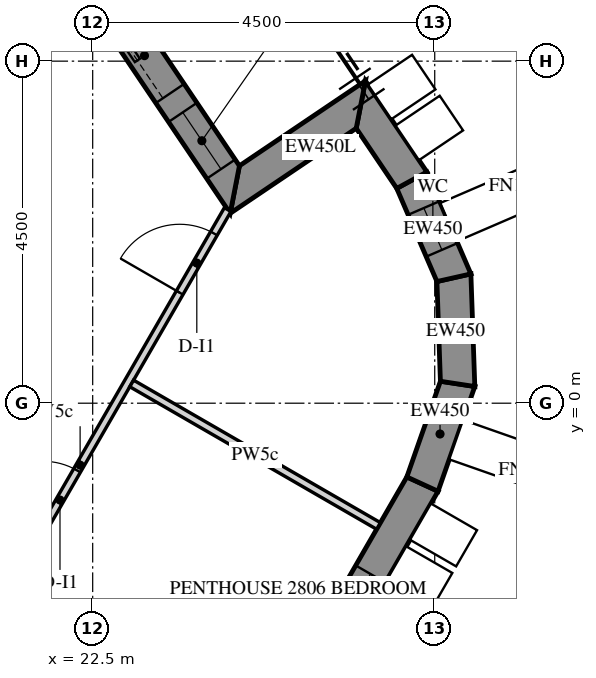
"""IFC4 building model, lengths in metres.
Left out: names, types, materials, properties, quantities, classifications, styles, units other than length and angle.
Written with IfcOpenShell. Run it as: python <this file> out.ifc"""

import sys

from ifc_helpers import new_model, si_unit, direction, frame, frame_2d, origin, place, context, subcontext, project, spatial, polyline, rectangle, outline, extrude, element, fill, save


model = new_model("IFC4")
c1 = context("Model", 3, precision=1e-05, world=origin(), true_north=direction((0.0, 1.0)))
c2 = subcontext(c1, "Body", "Model", "MODEL_VIEW")
j1 = project(units=[si_unit("LENGTHUNIT", "METRE"), si_unit("PLANEANGLEUNIT", "RADIAN")], contexts=[c1])
p1 = place(None, origin())
s1 = spatial("IfcSite", under=j1, at=p1, CompositionType="ELEMENT")
p2 = place(p1, origin())
s2 = spatial("IfcBuilding", under=s1, at=p2, CompositionType="ELEMENT")
p3 = place(p2, frame((0.0, 0.0, 361.2)))
s3 = spatial("IfcBuildingStorey", under=s2, at=p3, CompositionType="ELEMENT", Elevation=361.2)
p4 = place(p3, frame((15.273, -21.097, -0.15), z_axis=(0.0, 0.0, 1.0), x_axis=(0.499997453958, 0.866026873738, 0.0)))
e1 = element("IfcWall", 1, at=p4, inside=s3, PredefinedType="SOLIDWALL", context=c2, shape_type="SweptSolid", body=[
    extrude(outline(polyline([(-0.018, -0.225), (23.152, -0.225), (23.11, 0.225), (0.018, 0.225), (-0.018, -0.225)])), origin(), (0.0, 0.0, 1.0), 3.9),
])
p5 = place(p4, frame((1.366, 0.0, 0.45)))
e2 = element("IfcOpeningElement", 2, at=p5, cuts=e1, PredefinedType="OPENING", context=c2, shape_type="SweptSolid", body=[
    extrude(rectangle(XDim=2.4, YDim=3.0, at=frame_2d((1.2, 1.5))), frame((0.0, 0.235, 0.0), z_axis=(0.0, -1.0, 0.0), x_axis=(1.0, 0.0, 0.0)), (0.0, 0.0, 1.0), 0.47),
])
p6 = place(p4, frame((4.966, 0.0, 0.45)))
e3 = element("IfcOpeningElement", 3, at=p6, cuts=e1, PredefinedType="OPENING", context=c2, shape_type="SweptSolid", body=[
    extrude(rectangle(XDim=2.4, YDim=3.0, at=frame_2d((1.2, 1.5))), frame((0.0, 0.235, 0.0), z_axis=(0.0, -1.0, 0.0), x_axis=(1.0, 0.0, 0.0)), (0.0, 0.0, 1.0), 0.47),
])
p7 = place(p4, frame((8.566, 0.0, 0.45)))
e4 = element("IfcOpeningElement", 4, at=p7, cuts=e1, PredefinedType="OPENING", context=c2, shape_type="SweptSolid", body=[
    extrude(rectangle(XDim=2.4, YDim=3.0, at=frame_2d((1.2, 1.5))), frame((0.0, 0.235, 0.0), z_axis=(0.0, -1.0, 0.0), x_axis=(1.0, 0.0, 0.0)), (0.0, 0.0, 1.0), 0.47),
])
p8 = place(p4, frame((12.166, 0.0, 0.45)))
e5 = element("IfcOpeningElement", 5, at=p8, cuts=e1, PredefinedType="OPENING", context=c2, shape_type="SweptSolid", body=[
    extrude(rectangle(XDim=2.4, YDim=3.0, at=frame_2d((1.2, 1.5))), frame((0.0, 0.235, 0.0), z_axis=(0.0, -1.0, 0.0), x_axis=(1.0, 0.0, 0.0)), (0.0, 0.0, 1.0), 0.47),
])
p9 = place(p4, frame((15.766, 0.0, 0.45)))
e6 = element("IfcOpeningElement", 6, at=p9, cuts=e1, PredefinedType="OPENING", context=c2, shape_type="SweptSolid", body=[
    extrude(rectangle(XDim=2.4, YDim=3.0, at=frame_2d((1.2, 1.5))), frame((0.0, 0.235, 0.0), z_axis=(0.0, -1.0, 0.0), x_axis=(1.0, 0.0, 0.0)), (0.0, 0.0, 1.0), 0.47),
])
p10 = place(p4, frame((19.366, 0.0, 0.45)))
e7 = element("IfcOpeningElement", 7, at=p10, cuts=e1, PredefinedType="OPENING", context=c2, shape_type="SweptSolid", body=[
    extrude(rectangle(XDim=2.4, YDim=3.0, at=frame_2d((1.2, 1.5))), frame((0.0, 0.235, 0.0), z_axis=(0.0, -1.0, 0.0), x_axis=(1.0, 0.0, 0.0)), (0.0, 0.0, 1.0), 0.47),
])
p11 = place(p3, frame((26.838, -1.064, -0.15), z_axis=(0.0, 0.0, 1.0), x_axis=(0.331074067573, 0.943604769901, 0.0)))
e8 = element("IfcWall", 8, at=p11, inside=s3, PredefinedType="SOLIDWALL", context=c2, shape_type="SweptSolid", body=[
    extrude(outline(polyline([(-0.021, -0.225), (1.44, -0.225), (1.355, 0.225), (0.021, 0.225), (-0.021, -0.225)])), origin(), (0.0, 0.0, 1.0), 3.9),
])
p12 = place(p3, frame((27.301, 0.254, -0.15), z_axis=(0.0, 0.0, 1.0), x_axis=(-0.034763104447, 0.999395580623, 0.0)))
e9 = element("IfcWall", 9, at=p12, inside=s3, PredefinedType="SOLIDWALL", context=c2, shape_type="SweptSolid", body=[
    extrude(outline(polyline([(-0.042, -0.225), (1.44, -0.225), (1.355, 0.225), (0.042, 0.225), (-0.042, -0.225)])), origin(), (0.0, 0.0, 1.0), 3.9),
])
p13 = place(p3, frame((27.252, 1.651, -0.15), z_axis=(0.0, 0.0, 1.0), x_axis=(-0.396195073027, 0.918166359713, 0.0)))
e10 = element("IfcWall", 10, at=p13, inside=s3, PredefinedType="SOLIDWALL", context=c2, shape_type="SweptSolid", body=[
    extrude(outline(polyline([(-0.042, -0.225), (1.418, -0.225), (1.376, 0.225), (0.042, 0.225), (-0.042, -0.225)])), origin(), (0.0, 0.0, 1.0), 3.9),
])
p14 = place(p13, frame((0.399, 0.0, 1.05)))
e11 = element("IfcOpeningElement", 11, at=p14, cuts=e10, PredefinedType="OPENING", context=c2, shape_type="SweptSolid", body=[
    extrude(rectangle(XDim=0.6, YDim=2.4, at=frame_2d((0.3, 1.2))), frame((0.0, 0.235, 0.0), z_axis=(0.0, -1.0, 0.0), x_axis=(1.0, 0.0, 0.0)), (0.0, 0.0, 1.0), 0.47),
])
p15 = place(p3, frame((26.699, 2.934, -0.15), z_axis=(0.0, 0.0, 1.0), x_axis=(-0.559105892217, 0.829096255744, 0.0)))
e12 = element("IfcWall", 12, at=p15, inside=s3, PredefinedType="SOLIDWALL", context=c2, shape_type="SweptSolid", body=[
    extrude(outline(polyline([(-0.021, -0.225), (1.425, -0.225), (0.975, 0.225), (0.021, 0.225), (-0.021, -0.225)])), origin(), (0.0, 0.0, 1.0), 3.9),
])
p16 = place(p3, frame((26.028, 3.929, -0.15), z_axis=(0.0, 0.0, 1.0), x_axis=(-0.829052389485, -0.559170935841, 0.0)))
e13 = element("IfcWall", 13, at=p16, inside=s3, PredefinedType="SOLIDWALL", context=c2, shape_type="SweptSolid", body=[
    extrude(outline(polyline([(-0.225, -0.225), (1.775, -0.225), (2.225, 0.225), (0.225, 0.225), (-0.225, -0.225)])), origin(), (0.0, 0.0, 1.0), 3.9),
])
p17 = place(p3, frame((24.37, 2.811, -0.15), z_axis=(0.0, 0.0, 1.0), x_axis=(-0.559187034749, 0.829041531027, 0.0)))
e14 = element("IfcWall", 14, at=p17, inside=s3, PredefinedType="SOLIDWALL", context=c2, shape_type="SweptSolid", body=[
    extrude(outline(polyline([(0.225, -0.225), (20.506, -0.225), (20.957, 0.225), (-0.225, 0.225), (0.225, -0.225)])), origin(), (0.0, 0.0, 1.0), 3.9),
])
p18 = place(p17, frame((0.325, 0.0, 1.05)))
e15 = element("IfcOpeningElement", 15, at=p18, cuts=e14, PredefinedType="OPENING", context=c2, shape_type="SweptSolid", body=[
    extrude(rectangle(XDim=0.9, YDim=1.5, at=frame_2d((0.45, 0.75))), frame((0.0, 0.235, 0.0), z_axis=(0.0, -1.0, 0.0), x_axis=(1.0, 0.0, 0.0)), (0.0, 0.0, 1.0), 0.47),
])
p19 = place(p17, frame((1.525, 0.0, 0.15)))
e16 = element("IfcOpeningElement", 16, at=p19, cuts=e14, PredefinedType="OPENING", context=c2, shape_type="SweptSolid", body=[
    extrude(rectangle(XDim=1.2, YDim=2.4, at=frame_2d((0.6, 1.2))), frame((0.0, 0.235, 0.0), z_axis=(0.0, -1.0, 0.0), x_axis=(1.0, 0.0, 0.0)), (0.0, 0.0, 1.0), 0.47),
])
p20 = place(p17, frame((3.766, 0.0, 1.05)))
e17 = element("IfcOpeningElement", 17, at=p20, cuts=e14, PredefinedType="OPENING", context=c2, shape_type="SweptSolid", body=[
    extrude(rectangle(XDim=0.9, YDim=1.5, at=frame_2d((0.45, 0.75))), frame((0.0, 0.235, 0.0), z_axis=(0.0, -1.0, 0.0), x_axis=(1.0, 0.0, 0.0)), (0.0, 0.0, 1.0), 0.47),
])
p21 = place(p17, frame((4.966, 0.0, 0.15)))
e18 = element("IfcOpeningElement", 18, at=p21, cuts=e14, PredefinedType="OPENING", context=c2, shape_type="SweptSolid", body=[
    extrude(rectangle(XDim=1.2, YDim=2.4, at=frame_2d((0.6, 1.2))), frame((0.0, 0.235, 0.0), z_axis=(0.0, -1.0, 0.0), x_axis=(1.0, 0.0, 0.0)), (0.0, 0.0, 1.0), 0.47),
])
p22 = place(p17, frame((7.366, 0.0, 1.05)))
e19 = element("IfcOpeningElement", 19, at=p22, cuts=e14, PredefinedType="OPENING", context=c2, shape_type="SweptSolid", body=[
    extrude(rectangle(XDim=0.9, YDim=1.5, at=frame_2d((0.45, 0.75))), frame((0.0, 0.235, 0.0), z_axis=(0.0, -1.0, 0.0), x_axis=(1.0, 0.0, 0.0)), (0.0, 0.0, 1.0), 0.47),
])
p23 = place(p17, frame((8.566, 0.0, 0.15)))
e20 = element("IfcOpeningElement", 20, at=p23, cuts=e14, PredefinedType="OPENING", context=c2, shape_type="SweptSolid", body=[
    extrude(rectangle(XDim=1.2, YDim=2.4, at=frame_2d((0.6, 1.2))), frame((0.0, 0.235, 0.0), z_axis=(0.0, -1.0, 0.0), x_axis=(1.0, 0.0, 0.0)), (0.0, 0.0, 1.0), 0.47),
])
p24 = place(p17, frame((10.966, 0.0, 1.05)))
e21 = element("IfcOpeningElement", 21, at=p24, cuts=e14, PredefinedType="OPENING", context=c2, shape_type="SweptSolid", body=[
    extrude(rectangle(XDim=0.9, YDim=1.5, at=frame_2d((0.45, 0.75))), frame((0.0, 0.235, 0.0), z_axis=(0.0, -1.0, 0.0), x_axis=(1.0, 0.0, 0.0)), (0.0, 0.0, 1.0), 0.47),
])
p25 = place(p17, frame((12.166, 0.0, 0.15)))
e22 = element("IfcOpeningElement", 22, at=p25, cuts=e14, PredefinedType="OPENING", context=c2, shape_type="SweptSolid", body=[
    extrude(rectangle(XDim=1.2, YDim=2.4, at=frame_2d((0.6, 1.2))), frame((0.0, 0.235, 0.0), z_axis=(0.0, -1.0, 0.0), x_axis=(1.0, 0.0, 0.0)), (0.0, 0.0, 1.0), 0.47),
])
p26 = place(p17, frame((14.566, 0.0, 1.05)))
e23 = element("IfcOpeningElement", 23, at=p26, cuts=e14, PredefinedType="OPENING", context=c2, shape_type="SweptSolid", body=[
    extrude(rectangle(XDim=0.9, YDim=1.5, at=frame_2d((0.45, 0.75))), frame((0.0, 0.235, 0.0), z_axis=(0.0, -1.0, 0.0), x_axis=(1.0, 0.0, 0.0)), (0.0, 0.0, 1.0), 0.47),
])
p27 = place(p17, frame((15.766, 0.0, 0.15)))
e24 = element("IfcOpeningElement", 24, at=p27, cuts=e14, PredefinedType="OPENING", context=c2, shape_type="SweptSolid", body=[
    extrude(rectangle(XDim=1.2, YDim=2.4, at=frame_2d((0.6, 1.2))), frame((0.0, 0.235, 0.0), z_axis=(0.0, -1.0, 0.0), x_axis=(1.0, 0.0, 0.0)), (0.0, 0.0, 1.0), 0.47),
])
p28 = place(p17, frame((18.007, 0.0, 1.05)))
e25 = element("IfcOpeningElement", 25, at=p28, cuts=e14, PredefinedType="OPENING", context=c2, shape_type="SweptSolid", body=[
    extrude(rectangle(XDim=0.9, YDim=1.5, at=frame_2d((0.45, 0.75))), frame((0.0, 0.235, 0.0), z_axis=(0.0, -1.0, 0.0), x_axis=(1.0, 0.0, 0.0)), (0.0, 0.0, 1.0), 0.47),
])
p29 = place(p17, frame((19.207, 0.0, 0.15)))
e26 = element("IfcOpeningElement", 26, at=p29, cuts=e14, PredefinedType="OPENING", context=c2, shape_type="SweptSolid", body=[
    extrude(rectangle(XDim=1.2, YDim=2.4, at=frame_2d((0.6, 1.2))), frame((0.0, 0.235, 0.0), z_axis=(0.0, -1.0, 0.0), x_axis=(1.0, 0.0, 0.0)), (0.0, 0.0, 1.0), 0.47),
])
p30 = place(p3, frame((20.394, -4.177, 0.0), z_axis=(0.0, 0.0, 1.0), x_axis=(0.499991012162, 0.866030592853, 0.0)))
e27 = element("IfcWall", 27, at=p30, inside=s3, PredefinedType="PARTITIONING", context=c2, shape_type="SweptSolid", body=[
    extrude(rectangle(XDim=7.764, YDim=0.1, at=frame_2d((3.882, 0.0))), origin(), (0.0, 0.0, 1.0), 2.82),
])
p31 = place(p30, frame((2.902, 0.0, 0.0)))
e28 = element("IfcOpeningElement", 28, at=p31, cuts=e27, PredefinedType="OPENING", context=c2, shape_type="SweptSolid", body=[
    extrude(rectangle(XDim=0.9, YDim=2.1, at=frame_2d((0.45, 1.05))), frame((0.0, 0.06, 0.0), z_axis=(0.0, -1.0, 0.0), x_axis=(1.0, 0.0, 0.0)), (0.0, 0.0, 1.0), 0.12),
])
p32 = place(p30, frame((6.502, 0.0, 0.0)))
e29 = element("IfcOpeningElement", 29, at=p32, cuts=e27, PredefinedType="OPENING", context=c2, shape_type="SweptSolid", body=[
    extrude(rectangle(XDim=0.9, YDim=2.1, at=frame_2d((0.45, 1.05))), frame((0.0, 0.06, 0.0), z_axis=(0.0, -1.0, 0.0), x_axis=(1.0, 0.0, 0.0)), (0.0, 0.0, 1.0), 0.12),
])
p33 = place(p3, frame((26.261, -1.615, 0.0), z_axis=(0.0, 0.0, 1.0), x_axis=(-0.866022959057, 0.500004234368, 0.0)))
e30 = element("IfcWall", 30, at=p33, inside=s3, PredefinedType="PARTITIONING", context=c2, shape_type="SweptSolid", body=[
    extrude(rectangle(XDim=3.75, YDim=0.1, at=frame_2d((1.875, 0.0))), origin(), (0.0, 0.0, 1.0), 2.82),
])
p34 = place(p10, frame((0.0, 0.155, 0.0)))
e31 = element("IfcWindow", 31, at=p34, inside=s3, PartitioningType="DOUBLE_PANEL_VERTICAL", PredefinedType="WINDOW", context=c2, shape_type="SweptSolid", body=[
    extrude(rectangle(XDim=2.4, YDim=3.0, at=frame_2d((1.2, 1.5))), frame((0.0, 0.03, 0.0), z_axis=(0.0, -1.0, 0.0), x_axis=(1.0, 0.0, 0.0)), (0.0, 0.0, 1.0), 0.06),
])
fill(e7, e31)
p35 = place(p18, frame((0.0, 0.155, 0.0)))
e32 = element("IfcWindow", 32, at=p35, inside=s3, PartitioningType="SINGLE_PANEL", PredefinedType="WINDOW", context=c2, shape_type="SweptSolid", body=[
    extrude(rectangle(XDim=0.9, YDim=1.5, at=frame_2d((0.45, 0.75))), frame((0.0, 0.03, 0.0), z_axis=(0.0, -1.0, 0.0), x_axis=(1.0, 0.0, 0.0)), (0.0, 0.0, 1.0), 0.06),
])
fill(e15, e32)
p36 = place(p19, frame((0.0, 0.15, 0.0)))
e33 = element("IfcDoor", 33, at=p36, inside=s3, OperationType="SLIDING_TO_LEFT", PredefinedType="DOOR", context=c2, shape_type="SweptSolid", body=[
    extrude(rectangle(XDim=1.2, YDim=2.4, at=frame_2d((0.6, 1.2))), frame((0.0, 0.025, 0.0), z_axis=(0.0, -1.0, 0.0), x_axis=(1.0, 0.0, 0.0)), (0.0, 0.0, 1.0), 0.05),
])
fill(e16, e33)
p37 = place(p14, frame((0.0, 0.155, 0.0)))
e34 = element("IfcWindow", 34, at=p37, inside=s3, PartitioningType="SINGLE_PANEL", PredefinedType="WINDOW", context=c2, shape_type="SweptSolid", body=[
    extrude(rectangle(XDim=0.6, YDim=2.4, at=frame_2d((0.3, 1.2))), frame((0.0, 0.03, 0.0), z_axis=(0.0, -1.0, 0.0), x_axis=(1.0, 0.0, 0.0)), (0.0, 0.0, 1.0), 0.06),
])
fill(e11, e34)
p38 = place(p31, origin())
e35 = element("IfcDoor", 35, at=p38, inside=s3, OperationType="SINGLE_SWING_LEFT", PredefinedType="DOOR", context=c2, shape_type="SweptSolid", body=[
    extrude(rectangle(XDim=0.9, YDim=2.1, at=frame_2d((0.45, 1.05))), frame((0.0, 0.025, 0.0), z_axis=(0.0, -1.0, 0.0), x_axis=(1.0, 0.0, 0.0)), (0.0, 0.0, 1.0), 0.05),
])
fill(e28, e35)
p39 = place(p32, origin())
e36 = element("IfcDoor", 36, at=p39, inside=s3, OperationType="SINGLE_SWING_LEFT", PredefinedType="DOOR", context=c2, shape_type="SweptSolid", body=[
    extrude(rectangle(XDim=0.9, YDim=2.1, at=frame_2d((0.45, 1.05))), frame((0.0, 0.025, 0.0), z_axis=(0.0, -1.0, 0.0), x_axis=(1.0, 0.0, 0.0)), (0.0, 0.0, 1.0), 0.05),
])
fill(e29, e36)
save(model, sys.argv[1])
